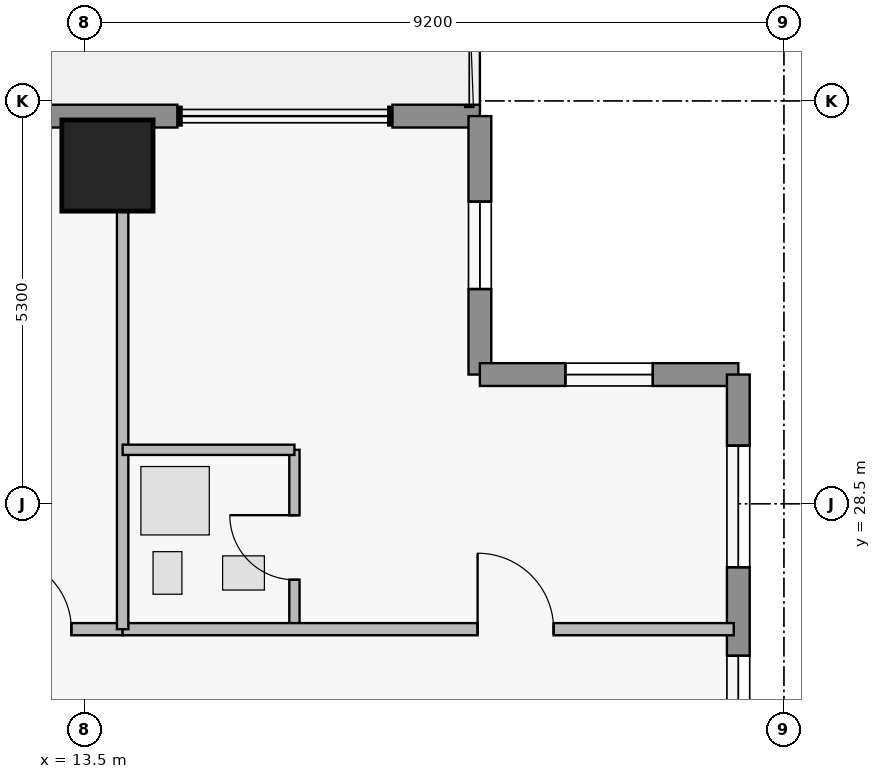
"""IFC4 building model, lengths in metres.
Left out: names, types, materials, properties, quantities, classifications, styles, units other than length and angle.
Written with IfcOpenShell. Run it as: python <this file> out.ifc"""

import sys

from ifc_helpers import new_model, si_unit, direction, frame, frame_2d, origin, origin_2d, place, context, subcontext, project, spatial, rectangle, extrude, element, fill, save


model = new_model("IFC4")
c1 = context("Model", 3, precision=1e-05, world=origin(), true_north=direction((0.0, 1.0)))
c2 = subcontext(c1, "Body", "Model", "MODEL_VIEW")
j1 = project(units=[si_unit("LENGTHUNIT", "METRE"), si_unit("PLANEANGLEUNIT", "RADIAN")], contexts=[c1])
p1 = place(None, origin())
s1 = spatial("IfcSite", under=j1, at=p1, CompositionType="ELEMENT")
p2 = place(p1, origin())
s2 = spatial("IfcBuilding", under=s1, at=p2, CompositionType="ELEMENT")
p3 = place(p2, frame((0.0, 0.0, 222.4)))
s3 = spatial("IfcBuildingStorey", under=s2, at=p3, CompositionType="ELEMENT", Elevation=222.4)
p4 = place(p3, frame((13.8, 32.95, 0.0), z_axis=(0.0, 0.0, 1.0), x_axis=(1.0, 0.0, 0.0)))
e1 = element("IfcColumn", 1, at=p4, inside=s3, PredefinedType="COLUMN", context=c2, shape_type="SweptSolid", body=[
    extrude(rectangle(XDim=1.2, YDim=1.2, at=origin_2d()), origin(), (0.0, 0.0, 1.0), 3.75),
])
p5 = place(p3, frame((12.88, 33.6, 0.0), z_axis=(0.0, 0.0, 1.0), x_axis=(1.0, 0.0, 0.0)))
e2 = element("IfcWall", 2, at=p5, inside=s3, PredefinedType="STANDARD", context=c2, shape_type="SweptSolid", body=[
    extrude(rectangle(XDim=1.84, YDim=0.3, at=frame_2d((0.92, 0.0))), origin(), (0.0, 0.0, 1.0), 3.53),
])
p6 = place(p3, frame((17.55, 33.6, 0.0), z_axis=(0.0, 0.0, 1.0), x_axis=(1.0, 0.0, 0.0)))
e3 = element("IfcWall", 3, at=p6, inside=s3, PredefinedType="STANDARD", context=c2, shape_type="SweptSolid", body=[
    extrude(rectangle(XDim=1.15, YDim=0.3, at=frame_2d((0.575, 0.0))), origin(), (0.0, 0.0, 1.0), 3.53),
])
p7 = place(p3, frame((18.7, 33.6, 0.0), z_axis=(0.0, 0.0, 1.0), x_axis=(0.0, -1.0, 0.0)))
e4 = element("IfcWall", 4, at=p7, inside=s3, PredefinedType="STANDARD", context=c2, shape_type="SweptSolid", body=[
    extrude(rectangle(XDim=3.4, YDim=0.3, at=frame_2d((1.7, 0.0))), origin(), (0.0, 0.0, 1.0), 3.53),
])
p8 = place(p7, frame((1.125, 0.0, 1.25)))
e5 = element("IfcOpeningElement", 5, at=p8, cuts=e4, PredefinedType="OPENING", context=c2, shape_type="SweptSolid", body=[
    extrude(rectangle(XDim=1.15, YDim=1.55, at=frame_2d((0.575, 0.775))), frame((0.0, 0.16, 0.0), z_axis=(0.0, -1.0, 0.0), x_axis=(1.0, 0.0, 0.0)), (0.0, 0.0, 1.0), 0.32),
])
p9 = place(p3, frame((18.7, 30.2, 0.0), z_axis=(0.0, 0.0, 1.0), x_axis=(1.0, 0.0, 0.0)))
e6 = element("IfcWall", 6, at=p9, inside=s3, PredefinedType="STANDARD", context=c2, shape_type="SweptSolid", body=[
    extrude(rectangle(XDim=3.4, YDim=0.3, at=frame_2d((1.7, 0.0))), origin(), (0.0, 0.0, 1.0), 3.53),
])
p10 = place(p9, frame((1.125, 0.0, 1.25)))
e7 = element("IfcOpeningElement", 7, at=p10, cuts=e6, PredefinedType="OPENING", context=c2, shape_type="SweptSolid", body=[
    extrude(rectangle(XDim=1.15, YDim=1.55, at=frame_2d((0.575, 0.775))), frame((0.0, 0.16, 0.0), z_axis=(0.0, -1.0, 0.0), x_axis=(1.0, 0.0, 0.0)), (0.0, 0.0, 1.0), 0.32),
])
p11 = place(p3, frame((22.1, 30.2, 0.0), z_axis=(0.0, 0.0, 1.0), x_axis=(0.0, -1.0, 0.0)))
e8 = element("IfcWall", 8, at=p11, inside=s3, PredefinedType="STANDARD", context=c2, shape_type="SweptSolid", body=[
    extrude(rectangle(XDim=5.65, YDim=0.3, at=frame_2d((2.825, 0.0))), origin(), (0.0, 0.0, 1.0), 3.53),
])
p12 = place(p11, frame((0.935, 0.0, 0.85)))
e9 = element("IfcOpeningElement", 9, at=p12, cuts=e8, PredefinedType="OPENING", context=c2, shape_type="SweptSolid", body=[
    extrude(rectangle(XDim=1.6, YDim=1.8, at=frame_2d((0.8, 0.9))), frame((0.0, 0.16, 0.0), z_axis=(0.0, -1.0, 0.0), x_axis=(1.0, 0.0, 0.0)), (0.0, 0.0, 1.0), 0.32),
])
p13 = place(p11, frame((3.7, 0.0, 0.95)))
e10 = element("IfcOpeningElement", 10, at=p13, cuts=e8, PredefinedType="OPENING", context=c2, shape_type="SweptSolid", body=[
    extrude(rectangle(XDim=1.15, YDim=1.55, at=frame_2d((0.575, 0.775))), frame((0.0, 0.16, 0.0), z_axis=(0.0, -1.0, 0.0), x_axis=(1.0, 0.0, 0.0)), (0.0, 0.0, 1.0), 0.32),
])
p14 = place(p3, frame((9.4, 26.85, 0.0), z_axis=(0.0, 0.0, 1.0), x_axis=(1.0, 0.0, 0.0)))
e11 = element("IfcWall", 11, at=p14, inside=s3, PredefinedType="PARTITIONING", context=c2, shape_type="SweptSolid", body=[
    extrude(rectangle(XDim=4.6, YDim=0.16, at=frame_2d((2.3, 0.0))), origin(), (0.0, 0.0, 1.0), 3.53),
])
p15 = place(p14, frame((2.975, 0.0, 0.0)))
e12 = element("IfcOpeningElement", 12, at=p15, cuts=e11, PredefinedType="OPENING", context=c2, shape_type="SweptSolid", body=[
    extrude(rectangle(XDim=0.95, YDim=2.15, at=frame_2d((0.475, 1.075))), frame((0.0, 0.09, 0.0), z_axis=(0.0, -1.0, 0.0), x_axis=(1.0, 0.0, 0.0)), (0.0, 0.0, 1.0), 0.18),
])
p16 = place(p3, frame((16.26, 26.85, 0.0), z_axis=(0.0, 0.0, 1.0), x_axis=(0.0, 1.0, 0.0)))
e13 = element("IfcWall", 13, at=p16, inside=s3, PredefinedType="PLUMBINGWALL", context=c2, shape_type="SweptSolid", body=[
    extrude(rectangle(XDim=2.36, YDim=0.135, at=frame_2d((1.18, 0.0))), origin(), (0.0, 0.0, 1.0), 3.53),
])
p17 = place(p16, frame((0.65, 0.0, 0.0)))
e14 = element("IfcOpeningElement", 14, at=p17, cuts=e13, PredefinedType="OPENING", context=c2, shape_type="SweptSolid", body=[
    extrude(rectangle(XDim=0.85, YDim=2.1, at=frame_2d((0.425, 1.05))), frame((0.0, 0.077, 0.0), z_axis=(0.0, -1.0, 0.0), x_axis=(1.0, 0.0, 0.0)), (0.0, 0.0, 1.0), 0.155),
])
p18 = place(p3, frame((14.0, 26.85, 0.0), z_axis=(0.0, 0.0, 1.0), x_axis=(1.0, 0.0, 0.0)))
e15 = element("IfcWall", 15, at=p18, inside=s3, PredefinedType="PARTITIONING", context=c2, shape_type="SweptSolid", body=[
    extrude(rectangle(XDim=8.04, YDim=0.16, at=frame_2d((4.02, 0.0))), origin(), (0.0, 0.0, 1.0), 3.53),
])
p19 = place(p18, frame((4.67, 0.0, 0.0)))
e16 = element("IfcOpeningElement", 16, at=p19, cuts=e15, PredefinedType="OPENING", context=c2, shape_type="SweptSolid", body=[
    extrude(rectangle(XDim=1.0, YDim=2.15, at=frame_2d((0.5, 1.075))), frame((0.0, 0.09, 0.0), z_axis=(0.0, -1.0, 0.0), x_axis=(1.0, 0.0, 0.0)), (0.0, 0.0, 1.0), 0.18),
])
p20 = place(p3, frame((14.0, 26.85, 0.0), z_axis=(0.0, 0.0, 1.0), x_axis=(0.0, 1.0, 0.0)))
e17 = element("IfcWall", 17, at=p20, inside=s3, PredefinedType="PARTITIONING", context=c2, shape_type="SweptSolid", body=[
    extrude(rectangle(XDim=6.67, YDim=0.15, at=frame_2d((3.335, 0.0))), origin(), (0.0, 0.0, 1.0), 2.519),
])
p21 = place(p3, frame((14.0, 29.21, 0.0), z_axis=(0.0, 0.0, 1.0), x_axis=(1.0, 0.0, 0.0)))
e18 = element("IfcWall", 18, at=p21, inside=s3, PredefinedType="PLUMBINGWALL", context=c2, shape_type="SweptSolid", body=[
    extrude(rectangle(XDim=2.26, YDim=0.135, at=frame_2d((1.13, 0.0))), origin(), (0.0, 0.0, 1.0), 3.53),
])
p22 = place(p8, origin())
e19 = element("IfcWindow", 19, at=p22, inside=s3, PartitioningType="SINGLE_PANEL", PredefinedType="WINDOW", context=c2, shape_type="SweptSolid", body=[
    extrude(rectangle(XDim=1.15, YDim=1.55, at=frame_2d((0.575, 0.775))), frame((0.0, 0.03, 0.0), z_axis=(0.0, -1.0, 0.0), x_axis=(1.0, 0.0, 0.0)), (0.0, 0.0, 1.0), 0.06),
])
fill(e5, e19)
p23 = place(p10, origin())
e20 = element("IfcWindow", 20, at=p23, inside=s3, PartitioningType="SINGLE_PANEL", PredefinedType="WINDOW", context=c2, shape_type="SweptSolid", body=[
    extrude(rectangle(XDim=1.15, YDim=1.55, at=frame_2d((0.575, 0.775))), frame((0.0, 0.03, 0.0), z_axis=(0.0, -1.0, 0.0), x_axis=(1.0, 0.0, 0.0)), (0.0, 0.0, 1.0), 0.06),
])
fill(e7, e20)
p24 = place(p12, origin())
e21 = element("IfcWindow", 21, at=p24, inside=s3, PartitioningType="SINGLE_PANEL", PredefinedType="WINDOW", context=c2, shape_type="SweptSolid", body=[
    extrude(rectangle(XDim=1.6, YDim=1.8, at=frame_2d((0.8, 0.9))), frame((0.0, 0.03, 0.0), z_axis=(0.0, -1.0, 0.0), x_axis=(1.0, 0.0, 0.0)), (0.0, 0.0, 1.0), 0.06),
])
fill(e9, e21)
p25 = place(p13, origin())
e22 = element("IfcWindow", 22, at=p25, inside=s3, PartitioningType="SINGLE_PANEL", PredefinedType="WINDOW", context=c2, shape_type="SweptSolid", body=[
    extrude(rectangle(XDim=1.15, YDim=1.55, at=frame_2d((0.575, 0.775))), frame((0.0, 0.03, 0.0), z_axis=(0.0, -1.0, 0.0), x_axis=(1.0, 0.0, 0.0)), (0.0, 0.0, 1.0), 0.06),
])
fill(e10, e22)
p26 = place(p15, origin())
e23 = element("IfcDoor", 23, at=p26, inside=s3, OperationType="SINGLE_SWING_LEFT", PredefinedType="DOOR", context=c2, shape_type="SweptSolid", body=[
    extrude(rectangle(XDim=0.95, YDim=2.15, at=frame_2d((0.475, 1.075))), frame((0.0, 0.025, 0.0), z_axis=(0.0, -1.0, 0.0), x_axis=(1.0, 0.0, 0.0)), (0.0, 0.0, 1.0), 0.05),
])
fill(e12, e23)
p27 = place(p17, origin())
e24 = element("IfcDoor", 24, at=p27, inside=s3, OperationType="SINGLE_SWING_RIGHT", PredefinedType="DOOR", context=c2, shape_type="SweptSolid", body=[
    extrude(rectangle(XDim=0.85, YDim=2.1, at=frame_2d((0.425, 1.05))), frame((0.0, 0.025, 0.0), z_axis=(0.0, -1.0, 0.0), x_axis=(1.0, 0.0, 0.0)), (0.0, 0.0, 1.0), 0.05),
])
fill(e14, e24)
p28 = place(p19, origin())
e25 = element("IfcDoor", 25, at=p28, inside=s3, OperationType="SINGLE_SWING_LEFT", PredefinedType="DOOR", context=c2, shape_type="SweptSolid", body=[
    extrude(rectangle(XDim=1.0, YDim=2.15, at=frame_2d((0.5, 1.075))), frame((0.0, 0.025, 0.0), z_axis=(0.0, -1.0, 0.0), x_axis=(1.0, 0.0, 0.0)), (0.0, 0.0, 1.0), 0.05),
])
fill(e16, e25)
save(model, sys.argv[1])
